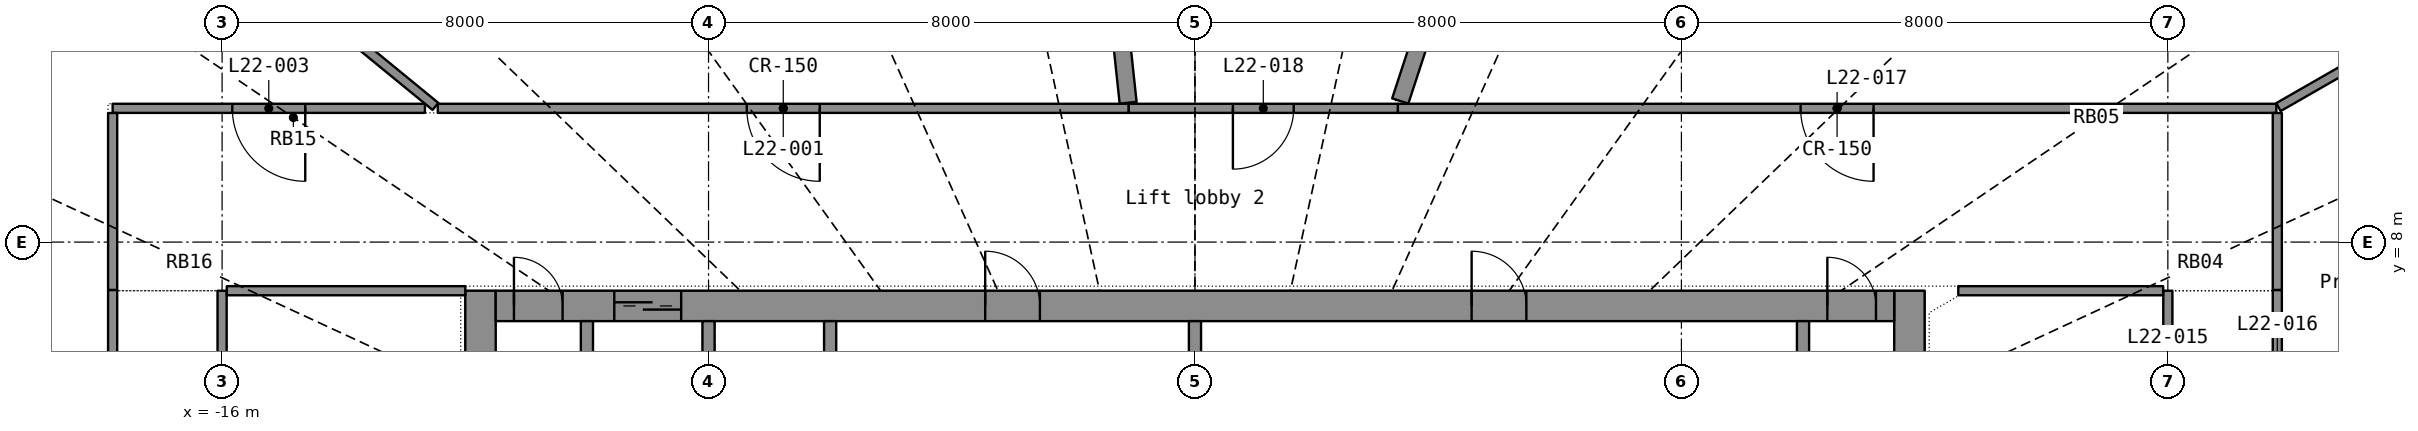
"""IFC4 building model, lengths in metres.
Left out: names, types, materials, properties, quantities, classifications, styles, units other than length and angle.
Written with IfcOpenShell. Run it as: python <this file> out.ifc"""

import sys

from ifc_helpers import new_model, si_unit, direction, frame, frame_2d, origin, place, context, subcontext, project, spatial, rectangle, extrude, element, fill, save


model = new_model("IFC4")
c1 = context("Model", 3, precision=1e-05, world=origin(), true_north=direction((0.0, 1.0)))
c2 = subcontext(c1, "Body", "Model", "MODEL_VIEW")
j1 = project(units=[si_unit("LENGTHUNIT", "METRE"), si_unit("PLANEANGLEUNIT", "RADIAN")], contexts=[c1])
p1 = place(None, origin())
s1 = spatial("IfcSite", under=j1, at=p1, CompositionType="ELEMENT")
p2 = place(p1, origin())
s2 = spatial("IfcBuilding", under=s1, at=p2, CompositionType="ELEMENT")
p3 = place(p2, frame((0.0, 0.0, 97.1)))
s3 = spatial("IfcBuildingStorey", under=s2, at=p3, CompositionType="ELEMENT", Elevation=97.1)
p4 = place(p3, frame((-11.75, -7.2, 0.0), z_axis=(0.0, 0.0, 1.0), x_axis=(0.0, 1.0, 0.0)))
e1 = element("IfcWall", 1, at=p4, inside=s3, PredefinedType="SHEAR", context=c2, shape_type="SweptSolid", body=[
    extrude(rectangle(XDim=14.4, YDim=0.5, at=frame_2d((7.2, 0.0))), origin(), (0.0, 0.0, 1.0), 3.3),
])
p5 = place(p4, frame((6.5, 0.0, 0.0)))
e2 = element("IfcOpeningElement", 2, at=p5, cuts=e1, PredefinedType="OPENING", context=c2, shape_type="SweptSolid", body=[
    extrude(rectangle(XDim=1.4, YDim=2.2, at=frame_2d((0.7, 1.1))), frame((0.0, 0.26, 0.0), z_axis=(0.0, -1.0, 0.0), x_axis=(1.0, 0.0, 0.0)), (0.0, 0.0, 1.0), 0.52),
])
p6 = place(p3, frame((11.75, -7.2, 0.0), z_axis=(0.0, 0.0, 1.0), x_axis=(0.0, 1.0, 0.0)))
e3 = element("IfcWall", 3, at=p6, inside=s3, PredefinedType="SHEAR", context=c2, shape_type="SweptSolid", body=[
    extrude(rectangle(XDim=14.4, YDim=0.5, at=frame_2d((7.2, 0.0))), origin(), (0.0, 0.0, 1.0), 3.3),
])
p7 = place(p6, frame((6.5, 0.0, 0.0)))
e4 = element("IfcOpeningElement", 4, at=p7, cuts=e3, PredefinedType="OPENING", context=c2, shape_type="SweptSolid", body=[
    extrude(rectangle(XDim=1.4, YDim=2.2, at=frame_2d((0.7, 1.1))), frame((0.0, 0.26, 0.0), z_axis=(0.0, -1.0, 0.0), x_axis=(1.0, 0.0, 0.0)), (0.0, 0.0, 1.0), 0.52),
])
p8 = place(p3, frame((-11.5, 6.95, 0.0), z_axis=(0.0, 0.0, 1.0), x_axis=(1.0, 0.0, 0.0)))
e5 = element("IfcWall", 5, at=p8, inside=s3, PredefinedType="SHEAR", context=c2, shape_type="SweptSolid", body=[
    extrude(rectangle(XDim=23.0, YDim=0.5, at=frame_2d((11.5, 0.0))), origin(), (0.0, 0.0, 1.0), 3.3),
])
p9 = place(p8, frame((1.95, 0.0, 0.0)))
e6 = element("IfcOpeningElement", 6, at=p9, cuts=e5, PredefinedType="OPENING", context=c2, shape_type="SweptSolid", body=[
    extrude(rectangle(XDim=1.1, YDim=2.2, at=frame_2d((0.55, 1.1))), frame((0.0, 0.26, 0.0), z_axis=(0.0, -1.0, 0.0), x_axis=(1.0, 0.0, 0.0)), (0.0, 0.0, 1.0), 0.52),
])
p10 = place(p8, frame((8.05, 0.0, 0.0)))
e7 = element("IfcOpeningElement", 7, at=p10, cuts=e5, PredefinedType="OPENING", context=c2, shape_type="SweptSolid", body=[
    extrude(rectangle(XDim=0.9, YDim=2.1, at=frame_2d((0.45, 1.05))), frame((0.0, 0.26, 0.0), z_axis=(0.0, -1.0, 0.0), x_axis=(1.0, 0.0, 0.0)), (0.0, 0.0, 1.0), 0.52),
])
p11 = place(p8, frame((16.05, 0.0, 0.0)))
e8 = element("IfcOpeningElement", 8, at=p11, cuts=e5, PredefinedType="OPENING", context=c2, shape_type="SweptSolid", body=[
    extrude(rectangle(XDim=0.9, YDim=2.1, at=frame_2d((0.45, 1.05))), frame((0.0, 0.26, 0.0), z_axis=(0.0, -1.0, 0.0), x_axis=(1.0, 0.0, 0.0)), (0.0, 0.0, 1.0), 0.52),
])
p12 = place(p8, frame((0.3, 0.0, 0.0)))
e9 = element("IfcOpeningElement", 9, at=p12, cuts=e5, PredefinedType="OPENING", context=c2, shape_type="SweptSolid", body=[
    extrude(rectangle(XDim=0.8, YDim=2.05, at=frame_2d((0.4, 1.025))), frame((0.0, 0.26, 0.0), z_axis=(0.0, -1.0, 0.0), x_axis=(1.0, 0.0, 0.0)), (0.0, 0.0, 1.0), 0.52),
])
p13 = place(p8, frame((21.9, 0.0, 0.0)))
e10 = element("IfcOpeningElement", 10, at=p13, cuts=e5, PredefinedType="OPENING", context=c2, shape_type="SweptSolid", body=[
    extrude(rectangle(XDim=0.8, YDim=2.05, at=frame_2d((0.4, 1.025))), frame((0.0, 0.26, 0.0), z_axis=(0.0, -1.0, 0.0), x_axis=(1.0, 0.0, 0.0)), (0.0, 0.0, 1.0), 0.52),
])
for number, where, z_axis, x_axis in (
    (11, (-10.0, 3.9, 0.0), (0.0, 0.0, 1.0), (0.0, 1.0, 0.0)),
    (12, (-8.0, 3.9, 0.0), (0.0, 0.0, 1.0), (0.0, 1.0, 0.0)),
    (13, (-6.0, 3.9, 0.0), (0.0, 0.0, 1.0), (0.0, 1.0, 0.0)),
    (14, (10.0, 3.9, 0.0), (0.0, 0.0, 1.0), (0.0, 1.0, 0.0)),
):
    element("IfcWall", number, at=place(p3, frame(where, z_axis=z_axis, x_axis=x_axis)), inside=s3, PredefinedType="SHEAR", context=c2, shape_type="SweptSolid", body=[
        extrude(rectangle(XDim=2.8, YDim=0.2, at=frame_2d((1.4, 0.0))), origin(), (0.0, 0.0, 1.0), 3.3),
    ])
p14 = place(p3, frame((0.0, 3.9, 0.0), z_axis=(0.0, 0.0, 1.0), x_axis=(0.0, 1.0, 0.0)))
e15 = element("IfcWall", 15, at=p14, inside=s3, PredefinedType="PARTITIONING", context=c2, shape_type="SweptSolid", body=[
    extrude(rectangle(XDim=2.8, YDim=0.2, at=frame_2d((1.4, 0.0))), origin(), (0.0, 0.0, 1.0), 3.3),
])
p15 = place(p3, frame((17.784, 10.2, 0.0), z_axis=(0.0, 0.0, 1.0), x_axis=(-1.0, 0.0, 0.0)))
e16 = element("IfcWall", 16, at=p15, inside=s3, PredefinedType="PARTITIONING", context=c2, shape_type="SweptSolid", body=[
    extrude(rectangle(XDim=14.447, YDim=0.15, at=frame_2d((7.224, 0.0))), origin(), (0.0, 0.0, 1.0), 2.4),
])
p16 = place(p15, frame((6.624, 0.0, 0.0)))
e17 = element("IfcOpeningElement", 17, at=p16, cuts=e16, PredefinedType="OPENING", context=c2, shape_type="SweptSolid", body=[
    extrude(rectangle(XDim=1.2, YDim=2.2, at=frame_2d((0.6, 1.1))), frame((0.0, 0.085, 0.0), z_axis=(0.0, -1.0, 0.0), x_axis=(1.0, 0.0, 0.0)), (0.0, 0.0, 1.0), 0.17),
])
p17 = place(p3, frame((-1.089, 10.2, 0.0), z_axis=(0.0, 0.0, 1.0), x_axis=(-1.0, 0.0, 0.0)))
e18 = element("IfcWall", 18, at=p17, inside=s3, PredefinedType="PARTITIONING", context=c2, shape_type="SweptSolid", body=[
    extrude(rectangle(XDim=11.363, YDim=0.15, at=frame_2d((5.682, 0.0))), origin(), (0.0, 0.0, 1.0), 2.4),
])
p18 = place(p17, frame((5.082, 0.0, 0.0)))
e19 = element("IfcOpeningElement", 19, at=p18, cuts=e18, PredefinedType="OPENING", context=c2, shape_type="SweptSolid", body=[
    extrude(rectangle(XDim=1.2, YDim=2.2, at=frame_2d((0.6, 1.1))), frame((0.0, 0.085, 0.0), z_axis=(0.0, -1.0, 0.0), x_axis=(1.0, 0.0, 0.0)), (0.0, 0.0, 1.0), 0.17),
])
p19 = place(p3, frame((-1.099, 10.292, 0.0), z_axis=(0.0, 0.0, 1.0), x_axis=(-0.106202827, 0.994344487, 0.0)))
e20 = element("IfcWall", 20, at=p19, inside=s3, PredefinedType="PARTITIONING", context=c2, shape_type="SweptSolid", body=[
    extrude(rectangle(XDim=10.857, YDim=0.28, at=frame_2d((5.429, 0.0))), origin(), (0.0, 0.0, 1.0), 2.4),
])
p20 = place(p19, frame((4.679, 0.0, 1.0)))
e21 = element("IfcOpeningElement", 21, at=p20, cuts=e20, PredefinedType="OPENING", context=c2, shape_type="SweptSolid", body=[
    extrude(rectangle(XDim=1.5, YDim=1.2, at=frame_2d((0.75, 0.6))), frame((0.0, 0.15, 0.0), z_axis=(0.0, -1.0, 0.0), x_axis=(1.0, 0.0, 0.0)), (0.0, 0.0, 1.0), 0.3),
])
p21 = place(p3, frame((6.689, 20.448, 0.0), z_axis=(0.0, 0.0, 1.0), x_axis=(-0.310888923, -0.950446252, 0.0)))
e22 = element("IfcWall", 22, at=p21, inside=s3, PredefinedType="PARTITIONING", context=c2, shape_type="SweptSolid", body=[
    extrude(rectangle(XDim=10.656, YDim=0.28, at=frame_2d((5.328, 0.0))), origin(), (0.0, 0.0, 1.0), 2.4),
])
p22 = place(p3, frame((-17.8, 7.212, 0.0), z_axis=(0.0, 0.0, 1.0), x_axis=(0.0, -1.0, 0.0)))
e23 = element("IfcWall", 23, at=p22, inside=s3, PredefinedType="PARTITIONING", context=c2, shape_type="SweptSolid", body=[
    extrude(rectangle(XDim=8.488, YDim=0.15, at=frame_2d((4.244, 0.0))), origin(), (0.0, 0.0, 1.0), 2.4),
])
p23 = place(p22, frame((3.644, 0.0, 0.0)))
e24 = element("IfcOpeningElement", 24, at=p23, cuts=e23, PredefinedType="OPENING", context=c2, shape_type="SweptSolid", body=[
    extrude(rectangle(XDim=1.2, YDim=2.2, at=frame_2d((0.6, 1.1))), frame((0.0, 0.085, 0.0), z_axis=(0.0, -1.0, 0.0), x_axis=(1.0, 0.0, 0.0)), (0.0, 0.0, 1.0), 0.17),
])
p24 = place(p3, frame((-18.283, 14.976, 0.0), z_axis=(0.0, 0.0, 1.0), x_axis=(0.773592541, -0.633683344, 0.0)))
e25 = element("IfcWall", 25, at=p24, inside=s3, PredefinedType="PARTITIONING", context=c2, shape_type="SweptSolid", body=[
    extrude(rectangle(XDim=7.488, YDim=0.15, at=frame_2d((3.744, 0.0))), origin(), (0.0, 0.0, 1.0), 2.4),
])
p25 = place(p3, frame((-16.0, 0.9, 0.0), z_axis=(0.0, 0.0, 1.0), x_axis=(0.0, 1.0, 0.0)))
e26 = element("IfcWall", 26, at=p25, inside=s3, PredefinedType="PARTITIONING", context=c2, shape_type="SweptSolid", body=[
    extrude(rectangle(XDim=6.3, YDim=0.15, at=frame_2d((3.15, 0.0))), origin(), (0.0, 0.0, 1.0), 2.4),
])
p26 = place(p25, frame((2.55, 0.0, 0.0)))
e27 = element("IfcOpeningElement", 27, at=p26, cuts=e26, PredefinedType="OPENING", context=c2, shape_type="SweptSolid", body=[
    extrude(rectangle(XDim=1.2, YDim=2.2, at=frame_2d((0.6, 1.1))), frame((0.0, 0.085, 0.0), z_axis=(0.0, -1.0, 0.0), x_axis=(1.0, 0.0, 0.0)), (0.0, 0.0, 1.0), 0.17),
])
p27 = place(p3, frame((-12.665, 10.2, 0.0), z_axis=(0.0, 0.0, 1.0), x_axis=(-1.0, 0.0, 0.0)))
e28 = element("IfcWall", 28, at=p27, inside=s3, PredefinedType="PARTITIONING", context=c2, shape_type="SweptSolid", body=[
    extrude(rectangle(XDim=5.135, YDim=0.15, at=frame_2d((2.568, 0.0))), origin(), (0.0, 0.0, 1.0), 2.4),
])
p28 = place(p27, frame((1.968, 0.0, 0.0)))
e29 = element("IfcOpeningElement", 29, at=p28, cuts=e28, PredefinedType="OPENING", context=c2, shape_type="SweptSolid", body=[
    extrude(rectangle(XDim=1.2, YDim=2.2, at=frame_2d((0.6, 1.1))), frame((0.0, 0.085, 0.0), z_axis=(0.0, -1.0, 0.0), x_axis=(1.0, 0.0, 0.0)), (0.0, 0.0, 1.0), 0.17),
])
p29 = place(p3, frame((3.336, 10.2, 0.0), z_axis=(0.0, 0.0, 1.0), x_axis=(-1.0, 0.0, 0.0)))
e30 = element("IfcWall", 30, at=p29, inside=s3, PredefinedType="PARTITIONING", context=c2, shape_type="SweptSolid", body=[
    extrude(rectangle(XDim=4.424, YDim=0.15, at=frame_2d((2.212, 0.0))), origin(), (0.0, 0.0, 1.0), 2.4),
])
p30 = place(p29, frame((1.712, 0.0, 0.0)))
e31 = element("IfcOpeningElement", 31, at=p30, cuts=e30, PredefinedType="OPENING", context=c2, shape_type="SweptSolid", body=[
    extrude(rectangle(XDim=1.0, YDim=2.2, at=frame_2d((0.5, 1.1))), frame((0.0, 0.085, 0.0), z_axis=(0.0, -1.0, 0.0), x_axis=(1.0, 0.0, 0.0)), (0.0, 0.0, 1.0), 0.17),
])
p31 = place(p3, frame((-15.923, 7.2, 0.0), z_axis=(0.0, 0.0, 1.0), x_axis=(1.0, 0.0, 0.0)))
e32 = element("IfcWall", 32, at=p31, inside=s3, PredefinedType="PARTITIONING", context=c2, shape_type="SweptSolid", body=[
    extrude(rectangle(XDim=3.923, YDim=0.15, at=frame_2d((1.961, 0.0))), origin(), (0.0, 0.0, 1.0), 2.4),
])
p32 = place(p3, frame((21.183, 12.149, 0.0), z_axis=(0.0, 0.0, 1.0), x_axis=(-0.867451833, -0.497521173, 0.0)))
e33 = element("IfcWall", 33, at=p32, inside=s3, PredefinedType="PARTITIONING", context=c2, shape_type="SweptSolid", body=[
    extrude(rectangle(XDim=3.879, YDim=0.15, at=frame_2d((1.939, 0.0))), origin(), (0.0, 0.0, 1.0), 2.4),
])
p33 = place(p3, frame((16.0, 7.2, 0.0), z_axis=(0.0, 0.0, 1.0), x_axis=(0.0, -1.0, 0.0)))
e34 = element("IfcWall", 34, at=p33, inside=s3, PredefinedType="PARTITIONING", context=c2, shape_type="SweptSolid", body=[
    extrude(rectangle(XDim=3.55, YDim=0.15, at=frame_2d((1.775, 0.0))), origin(), (0.0, 0.0, 1.0), 2.4),
])
p34 = place(p33, frame((1.3, 0.0, 0.0)))
e35 = element("IfcOpeningElement", 35, at=p34, cuts=e34, PredefinedType="OPENING", context=c2, shape_type="SweptSolid", body=[
    extrude(rectangle(XDim=0.95, YDim=2.15, at=frame_2d((0.475, 1.075))), frame((0.0, 0.085, 0.0), z_axis=(0.0, -1.0, 0.0), x_axis=(1.0, 0.0, 0.0)), (0.0, 0.0, 1.0), 0.17),
])
p35 = place(p3, frame((12.553, 7.2, 0.0), z_axis=(0.0, 0.0, 1.0), x_axis=(1.0, 0.0, 0.0)))
e36 = element("IfcWall", 36, at=p35, inside=s3, PredefinedType="PARTITIONING", context=c2, shape_type="SweptSolid", body=[
    extrude(rectangle(XDim=3.37, YDim=0.15, at=frame_2d((1.685, 0.0))), origin(), (0.0, 0.0, 1.0), 2.4),
])
p36 = place(p3, frame((17.8, 4.069, 0.0), z_axis=(0.0, 0.0, 1.0), x_axis=(0.0, 1.0, 0.0)))
e37 = element("IfcWall", 37, at=p36, inside=s3, PredefinedType="PARTITIONING", context=c2, shape_type="SweptSolid", body=[
    extrude(rectangle(XDim=3.143, YDim=0.15, at=frame_2d((1.572, 0.0))), origin(), (0.0, 0.0, 1.0), 2.4),
])
p37 = place(p36, frame((1.097, 0.0, 0.0)))
e38 = element("IfcOpeningElement", 38, at=p37, cuts=e37, PredefinedType="OPENING", context=c2, shape_type="SweptSolid", body=[
    extrude(rectangle(XDim=0.95, YDim=2.15, at=frame_2d((0.475, 1.075))), frame((0.0, 0.085, 0.0), z_axis=(0.0, -1.0, 0.0), x_axis=(1.0, 0.0, 0.0)), (0.0, 0.0, 1.0), 0.17),
])
for number, where, z_axis, x_axis in (
    (39, (17.8, 7.213, 0.0), (0.0, 0.0, 1.0), (0.0, 1.0, 0.0)),
    (40, (-17.8, 10.123, 0.0), (0.0, 0.0, 1.0), (0.0, -1.0, 0.0)),
):
    element("IfcWall", number, at=place(p3, frame(where, z_axis=z_axis, x_axis=x_axis)), inside=s3, PredefinedType="PARTITIONING", context=c2, shape_type="SweptSolid", body=[
        extrude(rectangle(XDim=2.91, YDim=0.15, at=frame_2d((1.455, 0.0))), origin(), (0.0, 0.0, 1.0), 2.4),
    ])
p38 = place(p9, origin())
e41 = element("IfcDoor", 41, at=p38, inside=s3, OperationType="DOUBLE_DOOR_SLIDING", PredefinedType="DOOR", context=c2, shape_type="SweptSolid", body=[
    extrude(rectangle(XDim=1.1, YDim=2.2, at=frame_2d((0.55, 1.1))), frame((0.0, 0.025, 0.0), z_axis=(0.0, -1.0, 0.0), x_axis=(1.0, 0.0, 0.0)), (0.0, 0.0, 1.0), 0.05),
])
fill(e6, e41)
p39 = place(p10, origin())
e42 = element("IfcDoor", 42, at=p39, inside=s3, OperationType="SINGLE_SWING_LEFT", PredefinedType="DOOR", context=c2, shape_type="SweptSolid", body=[
    extrude(rectangle(XDim=0.9, YDim=2.1, at=frame_2d((0.45, 1.05))), frame((0.0, 0.025, 0.0), z_axis=(0.0, -1.0, 0.0), x_axis=(1.0, 0.0, 0.0)), (0.0, 0.0, 1.0), 0.05),
])
fill(e7, e42)
p40 = place(p11, origin())
e43 = element("IfcDoor", 43, at=p40, inside=s3, OperationType="SINGLE_SWING_LEFT", PredefinedType="DOOR", context=c2, shape_type="SweptSolid", body=[
    extrude(rectangle(XDim=0.9, YDim=2.1, at=frame_2d((0.45, 1.05))), frame((0.0, 0.025, 0.0), z_axis=(0.0, -1.0, 0.0), x_axis=(1.0, 0.0, 0.0)), (0.0, 0.0, 1.0), 0.05),
])
fill(e8, e43)
p41 = place(p12, origin())
e44 = element("IfcDoor", 44, at=p41, inside=s3, OperationType="SINGLE_SWING_LEFT", PredefinedType="DOOR", context=c2, shape_type="SweptSolid", body=[
    extrude(rectangle(XDim=0.8, YDim=2.05, at=frame_2d((0.4, 1.025))), frame((0.0, 0.025, 0.0), z_axis=(0.0, -1.0, 0.0), x_axis=(1.0, 0.0, 0.0)), (0.0, 0.0, 1.0), 0.05),
])
fill(e9, e44)
p42 = place(p13, origin())
e45 = element("IfcDoor", 45, at=p42, inside=s3, OperationType="SINGLE_SWING_LEFT", PredefinedType="DOOR", context=c2, shape_type="SweptSolid", body=[
    extrude(rectangle(XDim=0.8, YDim=2.05, at=frame_2d((0.4, 1.025))), frame((0.0, 0.025, 0.0), z_axis=(0.0, -1.0, 0.0), x_axis=(1.0, 0.0, 0.0)), (0.0, 0.0, 1.0), 0.05),
])
fill(e10, e45)
p43 = place(p18, origin())
e46 = element("IfcDoor", 46, at=p43, inside=s3, OperationType="DOUBLE_DOOR_SINGLE_SWING", PredefinedType="DOOR", context=c2, shape_type="SweptSolid", body=[
    extrude(rectangle(XDim=1.2, YDim=2.2, at=frame_2d((0.6, 1.1))), frame((0.0, 0.025, 0.0), z_axis=(0.0, -1.0, 0.0), x_axis=(1.0, 0.0, 0.0)), (0.0, 0.0, 1.0), 0.05),
])
fill(e19, e46)
p44 = place(p28, origin())
e47 = element("IfcDoor", 47, at=p44, inside=s3, OperationType="DOUBLE_DOOR_SINGLE_SWING", PredefinedType="DOOR", context=c2, shape_type="SweptSolid", body=[
    extrude(rectangle(XDim=1.2, YDim=2.2, at=frame_2d((0.6, 1.1))), frame((0.0, 0.025, 0.0), z_axis=(0.0, -1.0, 0.0), x_axis=(1.0, 0.0, 0.0)), (0.0, 0.0, 1.0), 0.05),
])
fill(e29, e47)
p45 = place(p16, origin())
e48 = element("IfcDoor", 48, at=p45, inside=s3, OperationType="DOUBLE_DOOR_SINGLE_SWING", PredefinedType="DOOR", context=c2, shape_type="SweptSolid", body=[
    extrude(rectangle(XDim=1.2, YDim=2.2, at=frame_2d((0.6, 1.1))), frame((0.0, 0.025, 0.0), z_axis=(0.0, -1.0, 0.0), x_axis=(1.0, 0.0, 0.0)), (0.0, 0.0, 1.0), 0.05),
])
fill(e17, e48)
p46 = place(p30, origin())
e49 = element("IfcDoor", 49, at=p46, inside=s3, OperationType="SINGLE_SWING_RIGHT", PredefinedType="DOOR", context=c2, shape_type="SweptSolid", body=[
    extrude(rectangle(XDim=1.0, YDim=2.2, at=frame_2d((0.5, 1.1))), frame((0.0, 0.025, 0.0), z_axis=(0.0, -1.0, 0.0), x_axis=(1.0, 0.0, 0.0)), (0.0, 0.0, 1.0), 0.05),
])
fill(e31, e49)
save(model, sys.argv[1])
